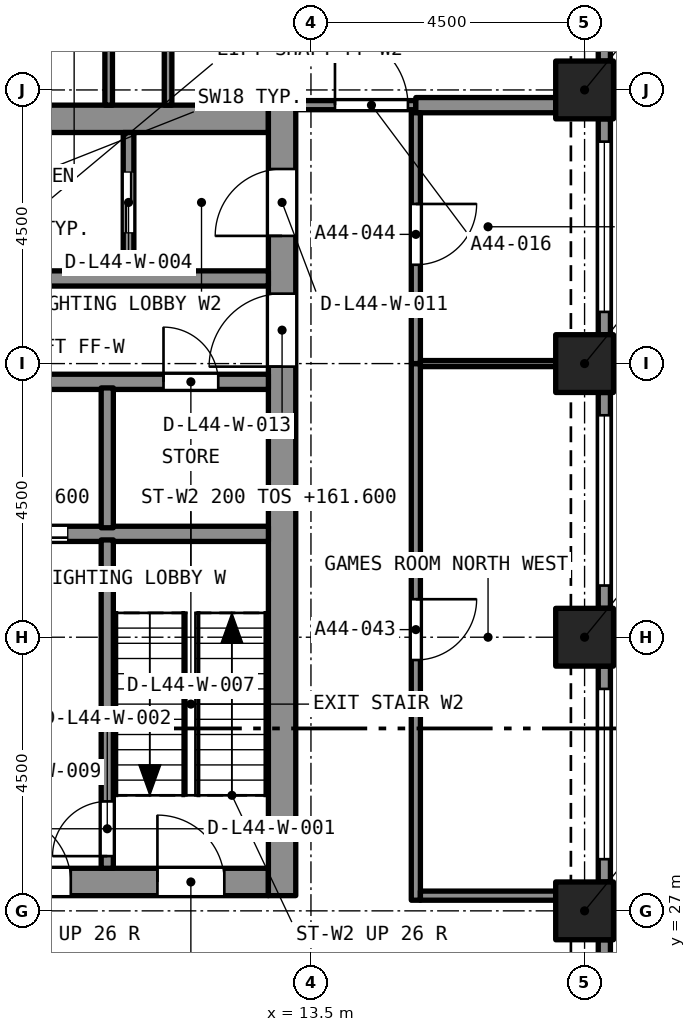
"""IFC4 building model, lengths in metres.
Left out: names, types, materials, properties, quantities, classifications, styles, units other than length and angle.
Written with IfcOpenShell. Run it as: python <this file> out.ifc"""

import sys

from ifc_helpers import new_model, si_unit, direction, frame, frame_2d, origin, origin_2d, place, context, subcontext, project, spatial, rectangle, extrude, element, fill, save


model = new_model("IFC4")
c1 = context("Model", 3, precision=1e-05, world=origin(), true_north=direction((0.0, 1.0)))
c2 = subcontext(c1, "Body", "Model", "MODEL_VIEW")
j1 = project(units=[si_unit("LENGTHUNIT", "METRE"), si_unit("PLANEANGLEUNIT", "RADIAN")], contexts=[c1])
p1 = place(None, origin())
s1 = spatial("IfcSite", under=j1, at=p1, CompositionType="ELEMENT")
p2 = place(p1, origin())
s2 = spatial("IfcBuilding", under=s1, at=p2, CompositionType="ELEMENT")
p3 = place(p2, frame((0.0, 0.0, 159.4)))
s3 = spatial("IfcBuildingStorey", under=s2, at=p3, CompositionType="ELEMENT", Elevation=159.4)
for number, where, z_axis, x_axis in (
    (1, (18.0, 27.0, 0.0), (0.0, 0.0, 1.0), (1.0, 0.0, 0.0)),
    (2, (18.0, 31.5, 0.0), (0.0, 0.0, 1.0), (1.0, 0.0, 0.0)),
    (3, (18.0, 36.0, 0.0), (0.0, 0.0, 1.0), (1.0, 0.0, 0.0)),
    (4, (18.0, 40.5, 0.0), (0.0, 0.0, 1.0), (1.0, 0.0, 0.0)),
):
    element("IfcColumn", number, at=place(p3, frame(where, z_axis=z_axis, x_axis=x_axis)), inside=s3, PredefinedType="COLUMN", context=c2, shape_type="SweptSolid", body=[
        extrude(rectangle(XDim=0.95, YDim=0.95, at=origin_2d()), origin(), (0.0, 0.0, 1.0), 4.4),
    ])
p4 = place(p3, frame((5.2, 27.475, 0.0), z_axis=(0.0, 0.0, 1.0), x_axis=(1.0, 0.0, 0.0)))
e5 = element("IfcWall", 5, at=p4, inside=s3, PredefinedType="SOLIDWALL", context=c2, shape_type="SweptSolid", body=[
    extrude(rectangle(XDim=7.6, YDim=0.45, at=frame_2d((3.8, 0.0))), origin(), (0.0, 0.0, 1.0), 4.4),
])
p5 = place(p4, frame((0.725, 0.0, 0.0)))
e6 = element("IfcOpeningElement", 6, at=p5, cuts=e5, PredefinedType="OPENING", context=c2, shape_type="SweptSolid", body=[
    extrude(rectangle(XDim=1.1, YDim=2.1, at=frame_2d((0.55, 1.05))), frame((0.0, 0.235, 0.0), z_axis=(0.0, -1.0, 0.0), x_axis=(1.0, 0.0, 0.0)), (0.0, 0.0, 1.0), 0.47),
])
p6 = place(p4, frame((3.25, 0.0, 0.0)))
e7 = element("IfcOpeningElement", 7, at=p6, cuts=e5, PredefinedType="OPENING", context=c2, shape_type="SweptSolid", body=[
    extrude(rectangle(XDim=1.1, YDim=2.1, at=frame_2d((0.55, 1.05))), frame((0.0, 0.235, 0.0), z_axis=(0.0, -1.0, 0.0), x_axis=(1.0, 0.0, 0.0)), (0.0, 0.0, 1.0), 0.47),
])
p7 = place(p4, frame((5.775, 0.0, 0.0)))
e8 = element("IfcOpeningElement", 8, at=p7, cuts=e5, PredefinedType="OPENING", context=c2, shape_type="SweptSolid", body=[
    extrude(rectangle(XDim=1.1, YDim=2.1, at=frame_2d((0.55, 1.05))), frame((0.0, 0.235, 0.0), z_axis=(0.0, -1.0, 0.0), x_axis=(1.0, 0.0, 0.0)), (0.0, 0.0, 1.0), 0.47),
])
p8 = place(p3, frame((5.2, 40.025, 0.0), z_axis=(0.0, 0.0, 1.0), x_axis=(1.0, 0.0, 0.0)))
e9 = element("IfcWall", 9, at=p8, inside=s3, PredefinedType="SOLIDWALL", context=c2, shape_type="SweptSolid", body=[
    extrude(rectangle(XDim=7.6, YDim=0.45, at=frame_2d((3.8, 0.0))), origin(), (0.0, 0.0, 1.0), 4.4),
])
p9 = place(p3, frame((13.025, 27.25, 0.0), z_axis=(0.0, 0.0, 1.0), x_axis=(0.0, 1.0, 0.0)))
e10 = element("IfcWall", 10, at=p9, inside=s3, PredefinedType="SOLIDWALL", context=c2, shape_type="SweptSolid", body=[
    extrude(rectangle(XDim=13.0, YDim=0.45, at=frame_2d((6.5, 0.0))), origin(), (0.0, 0.0, 1.0), 4.4),
])
p10 = place(p9, frame((10.85, 0.0, 0.0)))
e11 = element("IfcOpeningElement", 11, at=p10, cuts=e10, PredefinedType="OPENING", context=c2, shape_type="SweptSolid", body=[
    extrude(rectangle(XDim=1.1, YDim=2.1, at=frame_2d((0.55, 1.05))), frame((0.0, 0.235, 0.0), z_axis=(0.0, -1.0, 0.0), x_axis=(1.0, 0.0, 0.0)), (0.0, 0.0, 1.0), 0.47),
])
p11 = place(p9, frame((8.7, 0.0, 0.0)))
e12 = element("IfcOpeningElement", 12, at=p11, cuts=e10, PredefinedType="OPENING", context=c2, shape_type="SweptSolid", body=[
    extrude(rectangle(XDim=1.2, YDim=2.1, at=frame_2d((0.6, 1.05))), frame((0.0, 0.235, 0.0), z_axis=(0.0, -1.0, 0.0), x_axis=(1.0, 0.0, 0.0)), (0.0, 0.0, 1.0), 0.47),
])
p12 = place(p3, frame((18.325, 26.525, 0.0), z_axis=(0.0, 0.0, 1.0), x_axis=(0.0, -1.0, 0.0)))
e13 = element("IfcWall", 13, at=p12, inside=s3, PredefinedType="SOLIDWALL", context=c2, shape_type="SweptSolid", body=[
    extrude(rectangle(XDim=3.55, YDim=0.2, at=frame_2d((1.775, 0.0))), origin(), (0.0, 0.0, 1.0), 4.4),
])
p13 = place(p12, frame((0.375, 0.0, 0.45)))
e14 = element("IfcOpeningElement", 14, at=p13, cuts=e13, PredefinedType="OPENING", context=c2, shape_type="SweptSolid", body=[
    extrude(rectangle(XDim=2.8, YDim=2.55, at=frame_2d((1.4, 1.275))), frame((0.0, 0.11, 0.0), z_axis=(0.0, -1.0, 0.0), x_axis=(1.0, 0.0, 0.0)), (0.0, 0.0, 1.0), 0.22),
])
p14 = place(p3, frame((18.325, 31.025, 0.0), z_axis=(0.0, 0.0, 1.0), x_axis=(0.0, -1.0, 0.0)))
e15 = element("IfcWall", 15, at=p14, inside=s3, PredefinedType="SOLIDWALL", context=c2, shape_type="SweptSolid", body=[
    extrude(rectangle(XDim=3.55, YDim=0.2, at=frame_2d((1.775, 0.0))), origin(), (0.0, 0.0, 1.0), 4.4),
])
p15 = place(p14, frame((0.375, 0.0, 0.45)))
e16 = element("IfcOpeningElement", 16, at=p15, cuts=e15, PredefinedType="OPENING", context=c2, shape_type="SweptSolid", body=[
    extrude(rectangle(XDim=2.8, YDim=2.55, at=frame_2d((1.4, 1.275))), frame((0.0, 0.11, 0.0), z_axis=(0.0, -1.0, 0.0), x_axis=(1.0, 0.0, 0.0)), (0.0, 0.0, 1.0), 0.22),
])
p16 = place(p3, frame((18.325, 35.525, 0.0), z_axis=(0.0, 0.0, 1.0), x_axis=(0.0, -1.0, 0.0)))
e17 = element("IfcWall", 17, at=p16, inside=s3, PredefinedType="SOLIDWALL", context=c2, shape_type="SweptSolid", body=[
    extrude(rectangle(XDim=3.55, YDim=0.2, at=frame_2d((1.775, 0.0))), origin(), (0.0, 0.0, 1.0), 4.4),
])
p17 = place(p16, frame((0.375, 0.0, 0.45)))
e18 = element("IfcOpeningElement", 18, at=p17, cuts=e17, PredefinedType="OPENING", context=c2, shape_type="SweptSolid", body=[
    extrude(rectangle(XDim=2.8, YDim=2.55, at=frame_2d((1.4, 1.275))), frame((0.0, 0.11, 0.0), z_axis=(0.0, -1.0, 0.0), x_axis=(1.0, 0.0, 0.0)), (0.0, 0.0, 1.0), 0.22),
])
p18 = place(p3, frame((18.325, 40.025, 0.0), z_axis=(0.0, 0.0, 1.0), x_axis=(0.0, -1.0, 0.0)))
e19 = element("IfcWall", 19, at=p18, inside=s3, PredefinedType="SOLIDWALL", context=c2, shape_type="SweptSolid", body=[
    extrude(rectangle(XDim=3.55, YDim=0.2, at=frame_2d((1.775, 0.0))), origin(), (0.0, 0.0, 1.0), 4.4),
])
p19 = place(p18, frame((0.375, 0.0, 0.45)))
e20 = element("IfcOpeningElement", 20, at=p19, cuts=e19, PredefinedType="OPENING", context=c2, shape_type="SweptSolid", body=[
    extrude(rectangle(XDim=2.8, YDim=2.55, at=frame_2d((1.4, 1.275))), frame((0.0, 0.11, 0.0), z_axis=(0.0, -1.0, 0.0), x_axis=(1.0, 0.0, 0.0)), (0.0, 0.0, 1.0), 0.22),
])
p20 = place(p3, frame((18.325, 44.525, 0.0), z_axis=(0.0, 0.0, 1.0), x_axis=(0.0, -1.0, 0.0)))
e21 = element("IfcWall", 21, at=p20, inside=s3, PredefinedType="SOLIDWALL", context=c2, shape_type="SweptSolid", body=[
    extrude(rectangle(XDim=3.55, YDim=0.2, at=frame_2d((1.775, 0.0))), origin(), (0.0, 0.0, 1.0), 4.4),
])
p21 = place(p20, frame((0.375, 0.0, 0.45)))
e22 = element("IfcOpeningElement", 22, at=p21, cuts=e21, PredefinedType="OPENING", context=c2, shape_type="SweptSolid", body=[
    extrude(rectangle(XDim=2.8, YDim=2.55, at=frame_2d((1.4, 1.275))), frame((0.0, 0.11, 0.0), z_axis=(0.0, -1.0, 0.0), x_axis=(1.0, 0.0, 0.0)), (0.0, 0.0, 1.0), 0.22),
])
p22 = place(p3, frame((11.15, 40.25, 0.0), z_axis=(0.0, 0.0, 1.0), x_axis=(0.0, 1.0, 0.0)))
e23 = element("IfcWall", 23, at=p22, inside=s3, PredefinedType="PARTITIONING", context=c2, shape_type="SweptSolid", body=[
    extrude(rectangle(XDim=3.393, YDim=0.125, at=frame_2d((1.696, 0.0))), origin(), (0.0, 0.0, 1.0), 4.1),
])
p23 = place(p22, frame((2.41, 0.0, 0.0)))
e24 = element("IfcOpeningElement", 24, at=p23, cuts=e23, PredefinedType="OPENING", context=c2, shape_type="SweptSolid", body=[
    extrude(rectangle(XDim=0.8, YDim=2.1, at=frame_2d((0.4, 1.05))), frame((0.0, 0.073, 0.0), z_axis=(0.0, -1.0, 0.0), x_axis=(1.0, 0.0, 0.0)), (0.0, 0.0, 1.0), 0.145),
])
p24 = place(p3, frame((10.173, 40.25, 0.0), z_axis=(0.0, 0.0, 1.0), x_axis=(0.0, 1.0, 0.0)))
e25 = element("IfcWall", 25, at=p24, inside=s3, PredefinedType="PARTITIONING", context=c2, shape_type="SweptSolid", body=[
    extrude(rectangle(XDim=3.268, YDim=0.125, at=frame_2d((1.634, 0.0))), origin(), (0.0, 0.0, 1.0), 4.1),
])
p25 = place(p3, frame((13.25, 40.25, 0.0), z_axis=(0.0, 0.0, 1.0), x_axis=(1.0, 0.0, 0.0)))
e26 = element("IfcWall", 26, at=p25, inside=s3, PredefinedType="PARTITIONING", context=c2, shape_type="SweptSolid", body=[
    extrude(rectangle(XDim=1.975, YDim=0.15, at=frame_2d((0.988, 0.0))), origin(), (0.0, 0.0, 1.0), 4.1),
])
p26 = place(p25, frame((0.645, 0.0, 0.0)))
e27 = element("IfcOpeningElement", 27, at=p26, cuts=e26, PredefinedType="OPENING", context=c2, shape_type="SweptSolid", body=[
    extrude(rectangle(XDim=1.2, YDim=2.4, at=frame_2d((0.6, 1.2))), frame((0.0, 0.085, 0.0), z_axis=(0.0, -1.0, 0.0), x_axis=(1.0, 0.0, 0.0)), (0.0, 0.0, 1.0), 0.17),
])
p27 = place(p3, frame((15.225, 40.25, 0.0), z_axis=(0.0, 0.0, 1.0), x_axis=(1.0, 0.0, 0.0)))
e28 = element("IfcWall", 28, at=p27, inside=s3, PredefinedType="PARTITIONING", context=c2, shape_type="SweptSolid", body=[
    extrude(rectangle(XDim=2.3, YDim=0.25, at=frame_2d((1.15, 0.0))), origin(), (0.0, 0.0, 1.0), 4.1),
])
p28 = place(p3, frame((15.225, 36.0, 0.0), z_axis=(0.0, 0.0, 1.0), x_axis=(0.0, -1.0, 0.0)))
e29 = element("IfcWall", 29, at=p28, inside=s3, PredefinedType="PARTITIONING", context=c2, shape_type="SweptSolid", body=[
    extrude(rectangle(XDim=8.825, YDim=0.15, at=frame_2d((4.413, 0.0))), origin(), (0.0, 0.0, 1.0), 4.1),
])
p29 = place(p28, frame((3.875, 0.0, 0.0)))
e30 = element("IfcOpeningElement", 30, at=p29, cuts=e29, PredefinedType="OPENING", context=c2, shape_type="SweptSolid", body=[
    extrude(rectangle(XDim=1.0, YDim=2.1, at=frame_2d((0.5, 1.05))), frame((0.0, 0.085, 0.0), z_axis=(0.0, -1.0, 0.0), x_axis=(1.0, 0.0, 0.0)), (0.0, 0.0, 1.0), 0.17),
])
p30 = place(p3, frame((15.3, 27.25, 0.0), z_axis=(0.0, 0.0, 1.0), x_axis=(1.0, 0.0, 0.0)))
e31 = element("IfcWall", 31, at=p30, inside=s3, PredefinedType="PARTITIONING", context=c2, shape_type="SweptSolid", body=[
    extrude(rectangle(XDim=2.225, YDim=0.15, at=frame_2d((1.112, 0.0))), origin(), (0.0, 0.0, 1.0), 4.1),
])
p31 = place(p3, frame((15.225, 40.125, 0.0), z_axis=(0.0, 0.0, 1.0), x_axis=(0.0, -1.0, 0.0)))
e32 = element("IfcWall", 32, at=p31, inside=s3, PredefinedType="PARTITIONING", context=c2, shape_type="SweptSolid", body=[
    extrude(rectangle(XDim=4.125, YDim=0.15, at=frame_2d((2.062, 0.0))), origin(), (0.0, 0.0, 1.0), 4.1),
])
p32 = place(p31, frame((1.5, 0.0, 0.0)))
e33 = element("IfcOpeningElement", 33, at=p32, cuts=e32, PredefinedType="OPENING", context=c2, shape_type="SweptSolid", body=[
    extrude(rectangle(XDim=1.0, YDim=2.1, at=frame_2d((0.5, 1.05))), frame((0.0, 0.085, 0.0), z_axis=(0.0, -1.0, 0.0), x_axis=(1.0, 0.0, 0.0)), (0.0, 0.0, 1.0), 0.17),
])
p33 = place(p3, frame((15.3, 36.0, 0.0), z_axis=(0.0, 0.0, 1.0), x_axis=(1.0, 0.0, 0.0)))
e34 = element("IfcWall", 34, at=p33, inside=s3, PredefinedType="PARTITIONING", context=c2, shape_type="SweptSolid", body=[
    extrude(rectangle(XDim=2.225, YDim=0.1, at=frame_2d((1.112, 0.0))), origin(), (0.0, 0.0, 1.0), 4.1),
])
p34 = place(p3, frame((5.2, 33.2, 0.0), z_axis=(0.0, 0.0, 1.0), x_axis=(1.0, 0.0, 0.0)))
e35 = element("IfcWall", 35, at=p34, inside=s3, PredefinedType="SOLIDWALL", context=c2, shape_type="SweptSolid", body=[
    extrude(rectangle(XDim=7.6, YDim=0.25, at=frame_2d((3.8, 0.0))), origin(), (0.0, 0.0, 1.0), 4.1),
])
p35 = place(p34, frame((3.3, 0.0, 0.0)))
e36 = element("IfcOpeningElement", 36, at=p35, cuts=e35, PredefinedType="OPENING", context=c2, shape_type="SweptSolid", body=[
    extrude(rectangle(XDim=1.0, YDim=2.1, at=frame_2d((0.5, 1.05))), frame((0.0, 0.135, 0.0), z_axis=(0.0, -1.0, 0.0), x_axis=(1.0, 0.0, 0.0)), (0.0, 0.0, 1.0), 0.27),
])
p36 = place(p3, frame((5.2, 35.7, 0.0), z_axis=(0.0, 0.0, 1.0), x_axis=(1.0, 0.0, 0.0)))
e37 = element("IfcWall", 37, at=p36, inside=s3, PredefinedType="SOLIDWALL", context=c2, shape_type="SweptSolid", body=[
    extrude(rectangle(XDim=7.6, YDim=0.25, at=frame_2d((3.8, 0.0))), origin(), (0.0, 0.0, 1.0), 4.1),
])
p37 = place(p36, frame((0.725, 0.0, 0.0)))
e38 = element("IfcOpeningElement", 38, at=p37, cuts=e37, PredefinedType="OPENING", context=c2, shape_type="SweptSolid", body=[
    extrude(rectangle(XDim=1.1, YDim=2.4, at=frame_2d((0.55, 1.2))), frame((0.0, 0.135, 0.0), z_axis=(0.0, -1.0, 0.0), x_axis=(1.0, 0.0, 0.0)), (0.0, 0.0, 1.0), 0.27),
])
p38 = place(p36, frame((5.875, 0.0, 0.0)))
e39 = element("IfcOpeningElement", 39, at=p38, cuts=e37, PredefinedType="OPENING", context=c2, shape_type="SweptSolid", body=[
    extrude(rectangle(XDim=0.9, YDim=2.1, at=frame_2d((0.45, 1.05))), frame((0.0, 0.135, 0.0), z_axis=(0.0, -1.0, 0.0), x_axis=(1.0, 0.0, 0.0)), (0.0, 0.0, 1.0), 0.27),
])
p39 = place(p3, frame((5.2, 37.4, 0.0), z_axis=(0.0, 0.0, 1.0), x_axis=(1.0, 0.0, 0.0)))
e40 = element("IfcWall", 40, at=p39, inside=s3, PredefinedType="SOLIDWALL", context=c2, shape_type="SweptSolid", body=[
    extrude(rectangle(XDim=7.6, YDim=0.25, at=frame_2d((3.8, 0.0))), origin(), (0.0, 0.0, 1.0), 4.1),
])
p40 = place(p39, frame((0.7, 0.0, 0.0)))
e41 = element("IfcOpeningElement", 41, at=p40, cuts=e40, PredefinedType="OPENING", context=c2, shape_type="SweptSolid", body=[
    extrude(rectangle(XDim=1.1, YDim=2.4, at=frame_2d((0.55, 1.2))), frame((0.0, 0.135, 0.0), z_axis=(0.0, -1.0, 0.0), x_axis=(1.0, 0.0, 0.0)), (0.0, 0.0, 1.0), 0.27),
])
p41 = place(p3, frame((10.15, 27.7, 0.0), z_axis=(0.0, 0.0, 1.0), x_axis=(0.0, 1.0, 0.0)))
e42 = element("IfcWall", 42, at=p41, inside=s3, PredefinedType="SOLIDWALL", context=c2, shape_type="SweptSolid", body=[
    extrude(rectangle(XDim=5.4, YDim=0.2, at=frame_2d((2.7, 0.0))), origin(), (0.0, 0.0, 1.0), 4.1),
])
p42 = place(p41, frame((0.2, 0.0, 0.0)))
e43 = element("IfcOpeningElement", 43, at=p42, cuts=e42, PredefinedType="OPENING", context=c2, shape_type="SweptSolid", body=[
    extrude(rectangle(XDim=0.9, YDim=2.1, at=frame_2d((0.45, 1.05))), frame((0.0, 0.11, 0.0), z_axis=(0.0, -1.0, 0.0), x_axis=(1.0, 0.0, 0.0)), (0.0, 0.0, 1.0), 0.22),
])
p43 = place(p3, frame((10.15, 33.3, 0.0), z_axis=(0.0, 0.0, 1.0), x_axis=(0.0, 1.0, 0.0)))
e44 = element("IfcWall", 44, at=p43, inside=s3, PredefinedType="SOLIDWALL", context=c2, shape_type="SweptSolid", body=[
    extrude(rectangle(XDim=2.3, YDim=0.2, at=frame_2d((1.15, 0.0))), origin(), (0.0, 0.0, 1.0), 4.1),
])
p44 = place(p3, frame((10.5, 37.5, 0.0), z_axis=(0.0, 0.0, 1.0), x_axis=(0.0, 1.0, 0.0)))
e45 = element("IfcWall", 45, at=p44, inside=s3, PredefinedType="SOLIDWALL", context=c2, shape_type="SweptSolid", body=[
    extrude(rectangle(XDim=2.3, YDim=0.175, at=frame_2d((1.15, 0.0))), origin(), (0.0, 0.0, 1.0), 4.1),
])
p45 = place(p44, frame((0.65, 0.0, 0.0)))
e46 = element("IfcOpeningElement", 46, at=p45, cuts=e45, PredefinedType="OPENING", context=c2, shape_type="SweptSolid", body=[
    extrude(rectangle(XDim=1.0, YDim=2.1, at=frame_2d((0.5, 1.05))), frame((0.0, 0.097, 0.0), z_axis=(0.0, -1.0, 0.0), x_axis=(1.0, 0.0, 0.0)), (0.0, 0.0, 1.0), 0.195),
])
p46 = place(p15, origin())
e47 = element("IfcWindow", 47, at=p46, inside=s3, PartitioningType="SINGLE_PANEL", PredefinedType="WINDOW", context=c2, shape_type="SweptSolid", body=[
    extrude(rectangle(XDim=2.8, YDim=2.55, at=frame_2d((1.4, 1.275))), frame((0.0, 0.03, 0.0), z_axis=(0.0, -1.0, 0.0), x_axis=(1.0, 0.0, 0.0)), (0.0, 0.0, 1.0), 0.06),
])
fill(e16, e47)
p47 = place(p17, origin())
e48 = element("IfcWindow", 48, at=p47, inside=s3, PartitioningType="SINGLE_PANEL", PredefinedType="WINDOW", context=c2, shape_type="SweptSolid", body=[
    extrude(rectangle(XDim=2.8, YDim=2.55, at=frame_2d((1.4, 1.275))), frame((0.0, 0.03, 0.0), z_axis=(0.0, -1.0, 0.0), x_axis=(1.0, 0.0, 0.0)), (0.0, 0.0, 1.0), 0.06),
])
fill(e18, e48)
p48 = place(p19, origin())
e49 = element("IfcWindow", 49, at=p48, inside=s3, PartitioningType="SINGLE_PANEL", PredefinedType="WINDOW", context=c2, shape_type="SweptSolid", body=[
    extrude(rectangle(XDim=2.8, YDim=2.55, at=frame_2d((1.4, 1.275))), frame((0.0, 0.03, 0.0), z_axis=(0.0, -1.0, 0.0), x_axis=(1.0, 0.0, 0.0)), (0.0, 0.0, 1.0), 0.06),
])
fill(e20, e49)
p49 = place(p26, origin())
e50 = element("IfcDoor", 50, at=p49, inside=s3, OperationType="SINGLE_SWING_RIGHT", PredefinedType="DOOR", context=c2, shape_type="SweptSolid", body=[
    extrude(rectangle(XDim=1.2, YDim=2.4, at=frame_2d((0.6, 1.2))), frame((0.0, 0.025, 0.0), z_axis=(0.0, -1.0, 0.0), x_axis=(1.0, 0.0, 0.0)), (0.0, 0.0, 1.0), 0.05),
])
fill(e27, e50)
p50 = place(p29, origin())
e51 = element("IfcDoor", 51, at=p50, inside=s3, OperationType="SINGLE_SWING_LEFT", PredefinedType="DOOR", context=c2, shape_type="SweptSolid", body=[
    extrude(rectangle(XDim=1.0, YDim=2.1, at=frame_2d((0.5, 1.05))), frame((0.0, 0.025, 0.0), z_axis=(0.0, -1.0, 0.0), x_axis=(1.0, 0.0, 0.0)), (0.0, 0.0, 1.0), 0.05),
])
fill(e30, e51)
p51 = place(p32, origin())
e52 = element("IfcDoor", 52, at=p51, inside=s3, OperationType="SINGLE_SWING_LEFT", PredefinedType="DOOR", context=c2, shape_type="SweptSolid", body=[
    extrude(rectangle(XDim=1.0, YDim=2.1, at=frame_2d((0.5, 1.05))), frame((0.0, 0.025, 0.0), z_axis=(0.0, -1.0, 0.0), x_axis=(1.0, 0.0, 0.0)), (0.0, 0.0, 1.0), 0.05),
])
fill(e33, e52)
p52 = place(p42, origin())
e53 = element("IfcDoor", 53, at=p52, inside=s3, OperationType="SINGLE_SWING_LEFT", PredefinedType="DOOR", context=c2, shape_type="SweptSolid", body=[
    extrude(rectangle(XDim=0.9, YDim=2.1, at=frame_2d((0.45, 1.05))), frame((0.0, 0.025, 0.0), z_axis=(0.0, -1.0, 0.0), x_axis=(1.0, 0.0, 0.0)), (0.0, 0.0, 1.0), 0.05),
])
fill(e43, e53)
p53 = place(p45, origin())
e54 = element("IfcDoor", 54, at=p53, inside=s3, OperationType="SLIDING_TO_LEFT", PredefinedType="DOOR", context=c2, shape_type="SweptSolid", body=[
    extrude(rectangle(XDim=1.0, YDim=2.1, at=frame_2d((0.5, 1.05))), frame((0.0, 0.025, 0.0), z_axis=(0.0, -1.0, 0.0), x_axis=(1.0, 0.0, 0.0)), (0.0, 0.0, 1.0), 0.05),
])
fill(e46, e54)
p54 = place(p35, origin())
e55 = element("IfcDoor", 55, at=p54, inside=s3, OperationType="SLIDING_TO_LEFT", PredefinedType="DOOR", context=c2, shape_type="SweptSolid", body=[
    extrude(rectangle(XDim=1.0, YDim=2.1, at=frame_2d((0.5, 1.05))), frame((0.0, 0.025, 0.0), z_axis=(0.0, -1.0, 0.0), x_axis=(1.0, 0.0, 0.0)), (0.0, 0.0, 1.0), 0.05),
])
fill(e36, e55)
p55 = place(p38, origin())
e56 = element("IfcDoor", 56, at=p55, inside=s3, OperationType="SINGLE_SWING_LEFT", PredefinedType="DOOR", context=c2, shape_type="SweptSolid", body=[
    extrude(rectangle(XDim=0.9, YDim=2.1, at=frame_2d((0.45, 1.05))), frame((0.0, 0.025, 0.0), z_axis=(0.0, -1.0, 0.0), x_axis=(1.0, 0.0, 0.0)), (0.0, 0.0, 1.0), 0.05),
])
fill(e39, e56)
p56 = place(p6, origin())
e57 = element("IfcDoor", 57, at=p56, inside=s3, OperationType="SINGLE_SWING_LEFT", PredefinedType="DOOR", context=c2, shape_type="SweptSolid", body=[
    extrude(rectangle(XDim=1.1, YDim=2.1, at=frame_2d((0.55, 1.05))), frame((0.0, 0.025, 0.0), z_axis=(0.0, -1.0, 0.0), x_axis=(1.0, 0.0, 0.0)), (0.0, 0.0, 1.0), 0.05),
])
fill(e7, e57)
p57 = place(p7, origin())
e58 = element("IfcDoor", 58, at=p57, inside=s3, OperationType="SINGLE_SWING_LEFT", PredefinedType="DOOR", context=c2, shape_type="SweptSolid", body=[
    extrude(rectangle(XDim=1.1, YDim=2.1, at=frame_2d((0.55, 1.05))), frame((0.0, 0.025, 0.0), z_axis=(0.0, -1.0, 0.0), x_axis=(1.0, 0.0, 0.0)), (0.0, 0.0, 1.0), 0.05),
])
fill(e8, e58)
p58 = place(p10, origin())
e59 = element("IfcDoor", 59, at=p58, inside=s3, OperationType="SINGLE_SWING_LEFT", PredefinedType="DOOR", context=c2, shape_type="SweptSolid", body=[
    extrude(rectangle(XDim=1.1, YDim=2.1, at=frame_2d((0.55, 1.05))), frame((0.0, 0.025, 0.0), z_axis=(0.0, -1.0, 0.0), x_axis=(1.0, 0.0, 0.0)), (0.0, 0.0, 1.0), 0.05),
])
fill(e11, e59)
p59 = place(p11, origin())
e60 = element("IfcDoor", 60, at=p59, inside=s3, OperationType="SINGLE_SWING_LEFT", PredefinedType="DOOR", context=c2, shape_type="SweptSolid", body=[
    extrude(rectangle(XDim=1.2, YDim=2.1, at=frame_2d((0.6, 1.05))), frame((0.0, 0.025, 0.0), z_axis=(0.0, -1.0, 0.0), x_axis=(1.0, 0.0, 0.0)), (0.0, 0.0, 1.0), 0.05),
])
fill(e12, e60)
save(model, sys.argv[1])
